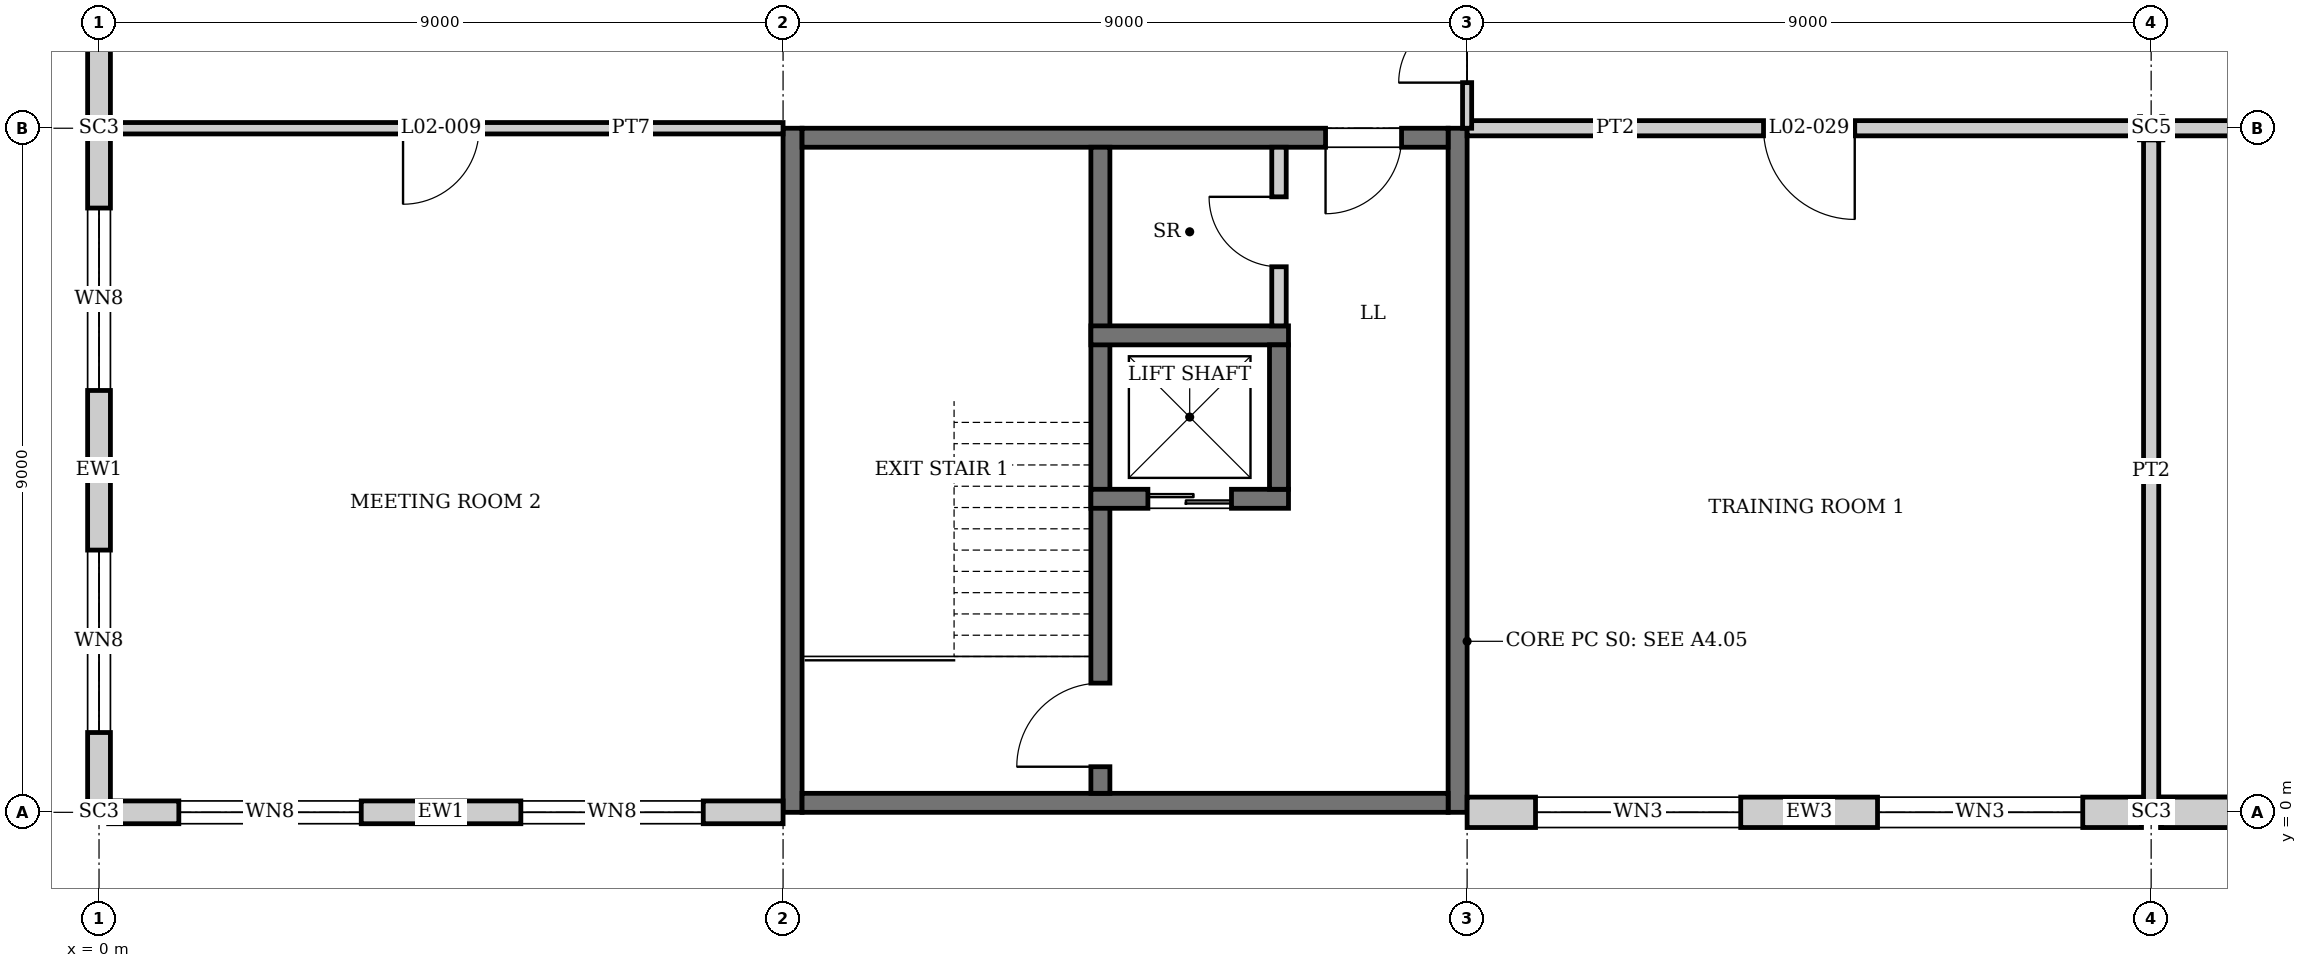
"""IFC4 building model, lengths in metres.
Left out: names, types, materials, properties, quantities, classifications, styles, units other than length and angle.
Written with IfcOpenShell. Run it as: python <this file> out.ifc"""

import sys

from ifc_helpers import new_model, si_unit, direction, frame, frame_2d, origin, origin_2d, place, context, subcontext, project, spatial, polyline, rectangle, i_section, outline, extrude, element, fill, save


model = new_model("IFC4")
c1 = context("Model", 3, precision=1e-05, world=origin(), true_north=direction((0.0, 1.0)))
c2 = subcontext(c1, "Body", "Model", "MODEL_VIEW")
j1 = project(units=[si_unit("LENGTHUNIT", "METRE"), si_unit("PLANEANGLEUNIT", "RADIAN")], contexts=[c1])
p1 = place(None, origin())
s1 = spatial("IfcSite", under=j1, at=p1, CompositionType="ELEMENT")
p2 = place(p1, origin())
s2 = spatial("IfcBuilding", under=s1, at=p2, CompositionType="ELEMENT")
p3 = place(p2, frame((0.0, 0.0, 10.5)))
s3 = spatial("IfcBuildingStorey", under=s2, at=p3, CompositionType="ELEMENT", Elevation=10.5)
for number, where, z_axis, x_axis in (
    (1, (0.0, 0.0, 0.0), (0.0, 0.0, 1.0), (0.0, 1.0, 0.0)),
    (2, (0.0, 9.0, 0.0), (0.0, 0.0, 1.0), (0.0, 1.0, 0.0)),
    (3, (27.0, 0.0, 0.0), (0.0, 0.0, 1.0), (0.0, 1.0, 0.0)),
):
    element("IfcColumn", number, at=place(p3, frame(where, z_axis=z_axis, x_axis=x_axis)), inside=s3, PredefinedType="COLUMN", context=c2, shape_type="SweptSolid", body=[
        extrude(i_section(OverallWidth=0.254, OverallDepth=0.254, WebThickness=0.009, FlangeThickness=0.014, at=origin_2d()), origin(), (0.0, 0.0, 1.0), 4.5),
    ])
p4 = place(p3, frame((27.0, 9.0, 0.0), z_axis=(0.0, 0.0, 1.0), x_axis=(0.0, 1.0, 0.0)))
e4 = element("IfcColumn", 4, at=p4, inside=s3, PredefinedType="COLUMN", context=c2, shape_type="SweptSolid", body=[
    extrude(i_section(OverallWidth=0.305, OverallDepth=0.308, WebThickness=0.01, FlangeThickness=0.015, at=origin_2d()), origin(), (0.0, 0.0, 1.0), 4.5),
])
for number, where, z_axis, x_axis in (
    (5, (9.125, 0.0, 0.0), (0.0, 0.0, 1.0), (0.0, 1.0, 0.0)),
    (6, (17.875, 0.0, 0.0), (0.0, 0.0, 1.0), (0.0, 1.0, 0.0)),
):
    element("IfcWall", number, at=place(p3, frame(where, z_axis=z_axis, x_axis=x_axis)), inside=s3, PredefinedType="SHEAR", context=c2, shape_type="SweptSolid", body=[
        extrude(rectangle(XDim=9.0, YDim=0.25, at=frame_2d((4.5, 0.0))), origin(), (0.0, 0.0, 1.0), 4.35),
    ])
p5 = place(p3, frame((9.25, 0.125, 0.0), z_axis=(0.0, 0.0, 1.0), x_axis=(1.0, 0.0, 0.0)))
e7 = element("IfcWall", 7, at=p5, inside=s3, PredefinedType="SHEAR", context=c2, shape_type="SweptSolid", body=[
    extrude(rectangle(XDim=8.5, YDim=0.25, at=frame_2d((4.25, 0.0))), origin(), (0.0, 0.0, 1.0), 4.35),
])
p6 = place(p3, frame((9.25, 8.875, 0.0), z_axis=(0.0, 0.0, 1.0), x_axis=(1.0, 0.0, 0.0)))
e8 = element("IfcWall", 8, at=p6, inside=s3, PredefinedType="SHEAR", context=c2, shape_type="SweptSolid", body=[
    extrude(rectangle(XDim=8.5, YDim=0.25, at=frame_2d((4.25, 0.0))), origin(), (0.0, 0.0, 1.0), 4.35),
])
p7 = place(p6, frame((6.887, 0.0, 0.0)))
e9 = element("IfcOpeningElement", 9, at=p7, cuts=e8, PredefinedType="OPENING", context=c2, shape_type="SweptSolid", body=[
    extrude(rectangle(XDim=1.0, YDim=2.1, at=frame_2d((0.5, 1.05))), frame((0.0, 0.135, 0.0), z_axis=(0.0, -1.0, 0.0), x_axis=(1.0, 0.0, 0.0)), (0.0, 0.0, 1.0), 0.27),
])
p8 = place(p3, frame((0.127, 0.0, 0.0), z_axis=(0.0, 0.0, 1.0), x_axis=(1.0, 0.0, 0.0)))
e10 = element("IfcWall", 10, at=p8, inside=s3, PredefinedType="SOLIDWALL", context=c2, shape_type="SweptSolid", body=[
    extrude(rectangle(XDim=8.873, YDim=0.3, at=frame_2d((4.437, 0.0))), origin(), (0.0, 0.0, 1.0), 3.991),
])
p9 = place(p8, frame((0.923, 0.0, 0.9)))
e11 = element("IfcOpeningElement", 11, at=p9, cuts=e10, PredefinedType="OPENING", context=c2, shape_type="SweptSolid", body=[
    extrude(rectangle(XDim=2.4, YDim=2.1, at=frame_2d((1.2, 1.05))), frame((0.0, 0.16, 0.0), z_axis=(0.0, -1.0, 0.0), x_axis=(1.0, 0.0, 0.0)), (0.0, 0.0, 1.0), 0.32),
])
p10 = place(p8, frame((5.423, 0.0, 0.9)))
e12 = element("IfcOpeningElement", 12, at=p10, cuts=e10, PredefinedType="OPENING", context=c2, shape_type="SweptSolid", body=[
    extrude(rectangle(XDim=2.4, YDim=2.1, at=frame_2d((1.2, 1.05))), frame((0.0, 0.16, 0.0), z_axis=(0.0, -1.0, 0.0), x_axis=(1.0, 0.0, 0.0)), (0.0, 0.0, 1.0), 0.32),
])
p11 = place(p3, frame((18.0, 0.0, 0.0), z_axis=(0.0, 0.0, 1.0), x_axis=(1.0, 0.0, 0.0)))
e13 = element("IfcWall", 13, at=p11, inside=s3, PredefinedType="SOLIDWALL", context=c2, shape_type="SweptSolid", body=[
    extrude(rectangle(XDim=8.873, YDim=0.4, at=frame_2d((4.437, 0.0))), origin(), (0.0, 0.0, 1.0), 3.991),
])
p12 = place(p11, frame((0.9, 0.0, 1.5)))
e14 = element("IfcOpeningElement", 14, at=p12, cuts=e13, PredefinedType="OPENING", context=c2, shape_type="SweptSolid", body=[
    extrude(rectangle(XDim=2.7, YDim=1.5, at=frame_2d((1.35, 0.75))), frame((0.0, 0.21, 0.0), z_axis=(0.0, -1.0, 0.0), x_axis=(1.0, 0.0, 0.0)), (0.0, 0.0, 1.0), 0.42),
])
p13 = place(p11, frame((5.4, 0.0, 1.5)))
e15 = element("IfcOpeningElement", 15, at=p13, cuts=e13, PredefinedType="OPENING", context=c2, shape_type="SweptSolid", body=[
    extrude(rectangle(XDim=2.7, YDim=1.5, at=frame_2d((1.35, 0.75))), frame((0.0, 0.21, 0.0), z_axis=(0.0, -1.0, 0.0), x_axis=(1.0, 0.0, 0.0)), (0.0, 0.0, 1.0), 0.42),
])
p14 = place(p3, frame((27.127, 0.0, 0.0), z_axis=(0.0, 0.0, 1.0), x_axis=(1.0, 0.0, 0.0)))
e16 = element("IfcWall", 16, at=p14, inside=s3, PredefinedType="SOLIDWALL", context=c2, shape_type="SweptSolid", body=[
    extrude(outline(polyline([(8.746, 0.0), (0.0, 0.0), (0.0, 0.5), (0.048, 0.38), (8.746, 3.86), (8.746, 0.0)])), frame((0.0, 0.2, 0.0), z_axis=(0.0, -1.0, 0.0), x_axis=(1.0, 0.0, 0.0)), (0.0, 0.0, 1.0), 0.4),
])
p15 = place(p3, frame((27.127, 0.0, 0.0), z_axis=(0.0, 0.0, 1.0), x_axis=(1.0, 0.0, 0.0)))
e17 = element("IfcWall", 17, at=p15, inside=s3, PredefinedType="SOLIDWALL", context=c2, shape_type="SweptSolid", body=[
    extrude(outline(polyline([(0.0, 3.991), (8.375, 3.991), (0.0, 0.64), (0.0, 3.991)])), frame((0.0, 0.2, 0.0), z_axis=(0.0, -1.0, 0.0), x_axis=(1.0, 0.0, 0.0)), (0.0, 0.0, 1.0), 0.4),
])
p16 = place(p3, frame((0.0, 0.127, 0.0), z_axis=(0.0, 0.0, 1.0), x_axis=(0.0, 1.0, 0.0)))
e18 = element("IfcWall", 18, at=p16, inside=s3, PredefinedType="SOLIDWALL", context=c2, shape_type="SweptSolid", body=[
    extrude(rectangle(XDim=8.746, YDim=0.3, at=frame_2d((4.373, 0.0))), origin(), (0.0, 0.0, 1.0), 3.991),
])
p17 = place(p16, frame((0.923, 0.0, 0.9)))
e19 = element("IfcOpeningElement", 19, at=p17, cuts=e18, PredefinedType="OPENING", context=c2, shape_type="SweptSolid", body=[
    extrude(rectangle(XDim=2.4, YDim=2.1, at=frame_2d((1.2, 1.05))), frame((0.0, 0.16, 0.0), z_axis=(0.0, -1.0, 0.0), x_axis=(1.0, 0.0, 0.0)), (0.0, 0.0, 1.0), 0.32),
])
p18 = place(p16, frame((5.423, 0.0, 0.9)))
e20 = element("IfcOpeningElement", 20, at=p18, cuts=e18, PredefinedType="OPENING", context=c2, shape_type="SweptSolid", body=[
    extrude(rectangle(XDim=2.4, YDim=2.1, at=frame_2d((1.2, 1.05))), frame((0.0, 0.16, 0.0), z_axis=(0.0, -1.0, 0.0), x_axis=(1.0, 0.0, 0.0)), (0.0, 0.0, 1.0), 0.32),
])
p19 = place(p3, frame((0.0, 9.127, 0.0), z_axis=(0.0, 0.0, 1.0), x_axis=(0.0, 1.0, 0.0)))
e21 = element("IfcWall", 21, at=p19, inside=s3, PredefinedType="SOLIDWALL", context=c2, shape_type="SweptSolid", body=[
    extrude(rectangle(XDim=8.873, YDim=0.3, at=frame_2d((4.437, 0.0))), origin(), (0.0, 0.0, 1.0), 3.991),
])
p20 = place(p19, frame((1.223, 0.0, 0.9)))
e22 = element("IfcOpeningElement", 22, at=p20, cuts=e21, PredefinedType="OPENING", context=c2, shape_type="SweptSolid", body=[
    extrude(rectangle(XDim=1.8, YDim=2.4, at=frame_2d((0.9, 1.2))), frame((0.0, 0.16, 0.0), z_axis=(0.0, -1.0, 0.0), x_axis=(1.0, 0.0, 0.0)), (0.0, 0.0, 1.0), 0.32),
])
p21 = place(p19, frame((5.723, 0.0, 0.9)))
e23 = element("IfcOpeningElement", 23, at=p21, cuts=e21, PredefinedType="OPENING", context=c2, shape_type="SweptSolid", body=[
    extrude(rectangle(XDim=1.8, YDim=2.4, at=frame_2d((0.9, 1.2))), frame((0.0, 0.16, 0.0), z_axis=(0.0, -1.0, 0.0), x_axis=(1.0, 0.0, 0.0)), (0.0, 0.0, 1.0), 0.32),
])
p22 = place(p3, frame((13.175, 0.25, 0.0), z_axis=(0.0, 0.0, 1.0), x_axis=(0.0, 1.0, 0.0)))
e24 = element("IfcWall", 24, at=p22, inside=s3, PredefinedType="SOLIDWALL", context=c2, shape_type="SweptSolid", body=[
    extrude(rectangle(XDim=8.5, YDim=0.25, at=frame_2d((4.25, 0.0))), origin(), (0.0, 0.0, 1.0), 4.35),
])
p23 = place(p22, frame((0.35, 0.0, 0.0)))
e25 = element("IfcOpeningElement", 25, at=p23, cuts=e24, PredefinedType="OPENING", context=c2, shape_type="SweptSolid", body=[
    extrude(rectangle(XDim=1.1, YDim=2.1, at=frame_2d((0.55, 1.05))), frame((0.0, 0.135, 0.0), z_axis=(0.0, -1.0, 0.0), x_axis=(1.0, 0.0, 0.0)), (0.0, 0.0, 1.0), 0.27),
])
p24 = place(p3, frame((13.05, 4.125, 0.0), z_axis=(0.0, 0.0, 1.0), x_axis=(1.0, 0.0, 0.0)))
e26 = element("IfcWall", 26, at=p24, inside=s3, PredefinedType="SOLIDWALL", context=c2, shape_type="SweptSolid", body=[
    extrude(rectangle(XDim=2.6, YDim=0.25, at=frame_2d((1.3, 0.0))), origin(), (0.0, 0.0, 1.0), 4.35),
])
p25 = place(p24, frame((0.75, 0.0, 0.0)))
e27 = element("IfcOpeningElement", 27, at=p25, cuts=e26, PredefinedType="OPENING", context=c2, shape_type="SweptSolid", body=[
    extrude(rectangle(XDim=1.1, YDim=2.1, at=frame_2d((0.55, 1.05))), frame((0.0, 0.135, 0.0), z_axis=(0.0, -1.0, 0.0), x_axis=(1.0, 0.0, 0.0)), (0.0, 0.0, 1.0), 0.27),
])
p26 = place(p3, frame((13.05, 6.275, 0.0), z_axis=(0.0, 0.0, 1.0), x_axis=(1.0, 0.0, 0.0)))
e28 = element("IfcWall", 28, at=p26, inside=s3, PredefinedType="SOLIDWALL", context=c2, shape_type="SweptSolid", body=[
    extrude(rectangle(XDim=2.6, YDim=0.25, at=frame_2d((1.3, 0.0))), origin(), (0.0, 0.0, 1.0), 4.35),
])
p27 = place(p3, frame((15.525, 4.25, 0.0), z_axis=(0.0, 0.0, 1.0), x_axis=(0.0, 1.0, 0.0)))
e29 = element("IfcWall", 29, at=p27, inside=s3, PredefinedType="SOLIDWALL", context=c2, shape_type="SweptSolid", body=[
    extrude(rectangle(XDim=1.9, YDim=0.25, at=frame_2d((0.95, 0.0))), origin(), (0.0, 0.0, 1.0), 4.35),
])
p28 = place(p3, frame((0.127, 9.0, 0.0), z_axis=(0.0, 0.0, 1.0), x_axis=(1.0, 0.0, 0.0)))
e30 = element("IfcWall", 30, at=p28, inside=s3, PredefinedType="PARTITIONING", context=c2, shape_type="SweptSolid", body=[
    extrude(rectangle(XDim=8.873, YDim=0.15, at=frame_2d((4.437, 0.0))), origin(), (0.0, 0.0, 1.0), 3.822),
])
p29 = place(p28, frame((3.873, 0.0, 0.0)))
e31 = element("IfcOpeningElement", 31, at=p29, cuts=e30, PredefinedType="OPENING", context=c2, shape_type="SweptSolid", body=[
    extrude(rectangle(XDim=1.0, YDim=2.1, at=frame_2d((0.5, 1.05))), frame((0.0, 0.085, 0.0), z_axis=(0.0, -1.0, 0.0), x_axis=(1.0, 0.0, 0.0)), (0.0, 0.0, 1.0), 0.17),
])
p30 = place(p3, frame((18.0, 9.0, 0.0), z_axis=(0.0, 0.0, 1.0), x_axis=(1.0, 0.0, 0.0)))
e32 = element("IfcWall", 32, at=p30, inside=s3, PredefinedType="PARTITIONING", context=c2, shape_type="SweptSolid", body=[
    extrude(rectangle(XDim=8.846, YDim=0.2, at=frame_2d((4.423, 0.0))), origin(), (0.0, 0.0, 1.0), 2.414),
])
p31 = place(p30, frame((3.9, 0.0, 0.0)))
e33 = element("IfcOpeningElement", 33, at=p31, cuts=e32, PredefinedType="OPENING", context=c2, shape_type="SweptSolid", body=[
    extrude(rectangle(XDim=1.2, YDim=2.1, at=frame_2d((0.6, 1.05))), frame((0.0, 0.11, 0.0), z_axis=(0.0, -1.0, 0.0), x_axis=(1.0, 0.0, 0.0)), (0.0, 0.0, 1.0), 0.22),
])
p32 = place(p3, frame((27.154, 9.0, 0.0), z_axis=(0.0, 0.0, 1.0), x_axis=(1.0, 0.0, 0.0)))
e34 = element("IfcWall", 34, at=p32, inside=s3, PredefinedType="PARTITIONING", context=c2, shape_type="SweptSolid", body=[
    extrude(rectangle(XDim=8.692, YDim=0.2, at=frame_2d((4.346, 0.0))), origin(), (0.0, 0.0, 1.0), 2.414),
])
p33 = place(p3, frame((15.525, 6.4, 0.0), z_axis=(0.0, 0.0, 1.0), x_axis=(0.0, 1.0, 0.0)))
e35 = element("IfcWall", 35, at=p33, inside=s3, PredefinedType="PARTITIONING", context=c2, shape_type="SweptSolid", body=[
    extrude(rectangle(XDim=2.35, YDim=0.19, at=frame_2d((1.175, 0.0))), origin(), (0.0, 0.0, 1.0), 4.35),
])
p34 = place(p33, frame((0.778, 0.0, 0.0)))
e36 = element("IfcOpeningElement", 36, at=p34, cuts=e35, PredefinedType="OPENING", context=c2, shape_type="SweptSolid", body=[
    extrude(rectangle(XDim=0.92, YDim=2.1, at=frame_2d((0.46, 1.05))), frame((0.0, 0.105, 0.0), z_axis=(0.0, -1.0, 0.0), x_axis=(1.0, 0.0, 0.0)), (0.0, 0.0, 1.0), 0.21),
])
p35 = place(p3, frame((18.0, 9.0, 0.0), z_axis=(0.0, 0.0, 1.0), x_axis=(0.0, 1.0, 0.0)))
e37 = element("IfcWall", 37, at=p35, inside=s3, PredefinedType="PARTITIONING", context=c2, shape_type="SweptSolid", body=[
    extrude(rectangle(XDim=3.0, YDim=0.12, at=frame_2d((1.5, 0.0))), origin(), (0.0, 0.0, 1.0), 2.414),
])
p36 = place(p35, frame((0.6, 0.0, 0.0)))
e38 = element("IfcOpeningElement", 38, at=p36, cuts=e37, PredefinedType="OPENING", context=c2, shape_type="SweptSolid", body=[
    extrude(rectangle(XDim=1.8, YDim=2.1, at=frame_2d((0.9, 1.05))), frame((0.0, 0.07, 0.0), z_axis=(0.0, -1.0, 0.0), x_axis=(1.0, 0.0, 0.0)), (0.0, 0.0, 1.0), 0.14),
])
p37 = place(p3, frame((27.0, 0.127, 0.0), z_axis=(0.0, 0.0, 1.0), x_axis=(0.0, 1.0, 0.0)))
e39 = element("IfcWall", 39, at=p37, inside=s3, PredefinedType="PARTITIONING", context=c2, shape_type="SweptSolid", body=[
    extrude(rectangle(XDim=8.719, YDim=0.2, at=frame_2d((4.359, 0.0))), origin(), (0.0, 0.0, 1.0), 3.998),
])
p38 = place(p9, origin())
e40 = element("IfcWindow", 40, at=p38, inside=s3, PartitioningType="SINGLE_PANEL", PredefinedType="WINDOW", context=c2, shape_type="SweptSolid", body=[
    extrude(rectangle(XDim=2.4, YDim=2.1, at=frame_2d((1.2, 1.05))), frame((0.0, 0.03, 0.0), z_axis=(0.0, -1.0, 0.0), x_axis=(1.0, 0.0, 0.0)), (0.0, 0.0, 1.0), 0.06),
])
fill(e11, e40)
p39 = place(p10, origin())
e41 = element("IfcWindow", 41, at=p39, inside=s3, PartitioningType="SINGLE_PANEL", PredefinedType="WINDOW", context=c2, shape_type="SweptSolid", body=[
    extrude(rectangle(XDim=2.4, YDim=2.1, at=frame_2d((1.2, 1.05))), frame((0.0, 0.03, 0.0), z_axis=(0.0, -1.0, 0.0), x_axis=(1.0, 0.0, 0.0)), (0.0, 0.0, 1.0), 0.06),
])
fill(e12, e41)
p40 = place(p12, origin())
e42 = element("IfcWindow", 42, at=p40, inside=s3, PartitioningType="SINGLE_PANEL", PredefinedType="WINDOW", context=c2, shape_type="SweptSolid", body=[
    extrude(rectangle(XDim=2.7, YDim=1.5, at=frame_2d((1.35, 0.75))), frame((0.0, 0.03, 0.0), z_axis=(0.0, -1.0, 0.0), x_axis=(1.0, 0.0, 0.0)), (0.0, 0.0, 1.0), 0.06),
])
fill(e14, e42)
p41 = place(p13, origin())
e43 = element("IfcWindow", 43, at=p41, inside=s3, PartitioningType="SINGLE_PANEL", PredefinedType="WINDOW", context=c2, shape_type="SweptSolid", body=[
    extrude(rectangle(XDim=2.7, YDim=1.5, at=frame_2d((1.35, 0.75))), frame((0.0, 0.03, 0.0), z_axis=(0.0, -1.0, 0.0), x_axis=(1.0, 0.0, 0.0)), (0.0, 0.0, 1.0), 0.06),
])
fill(e15, e43)
p42 = place(p17, origin())
e44 = element("IfcWindow", 44, at=p42, inside=s3, PartitioningType="SINGLE_PANEL", PredefinedType="WINDOW", context=c2, shape_type="SweptSolid", body=[
    extrude(rectangle(XDim=2.4, YDim=2.1, at=frame_2d((1.2, 1.05))), frame((0.0, 0.03, 0.0), z_axis=(0.0, -1.0, 0.0), x_axis=(1.0, 0.0, 0.0)), (0.0, 0.0, 1.0), 0.06),
])
fill(e19, e44)
p43 = place(p18, origin())
e45 = element("IfcWindow", 45, at=p43, inside=s3, PartitioningType="SINGLE_PANEL", PredefinedType="WINDOW", context=c2, shape_type="SweptSolid", body=[
    extrude(rectangle(XDim=2.4, YDim=2.1, at=frame_2d((1.2, 1.05))), frame((0.0, 0.03, 0.0), z_axis=(0.0, -1.0, 0.0), x_axis=(1.0, 0.0, 0.0)), (0.0, 0.0, 1.0), 0.06),
])
fill(e20, e45)
p44 = place(p25, origin())
e46 = element("IfcDoor", 46, at=p44, inside=s3, OperationType="DOUBLE_DOOR_SLIDING", PredefinedType="DOOR", context=c2, shape_type="SweptSolid", body=[
    extrude(rectangle(XDim=1.1, YDim=2.1, at=frame_2d((0.55, 1.05))), frame((0.0, 0.025, 0.0), z_axis=(0.0, -1.0, 0.0), x_axis=(1.0, 0.0, 0.0)), (0.0, 0.0, 1.0), 0.05),
])
fill(e27, e46)
p45 = place(p36, origin())
e47 = element("IfcDoor", 47, at=p45, inside=s3, OperationType="DOUBLE_DOOR_SINGLE_SWING", PredefinedType="DOOR", context=c2, shape_type="SweptSolid", body=[
    extrude(rectangle(XDim=1.8, YDim=2.1, at=frame_2d((0.9, 1.05))), frame((0.0, 0.025, 0.0), z_axis=(0.0, -1.0, 0.0), x_axis=(1.0, 0.0, 0.0)), (0.0, 0.0, 1.0), 0.05),
])
fill(e38, e47)
p46 = place(p29, frame((1.0, 0.0, 0.0), z_axis=(0.0, 0.0, 1.0), x_axis=(-1.0, 0.0, 0.0)))
e48 = element("IfcDoor", 48, at=p46, inside=s3, OperationType="SINGLE_SWING_RIGHT", PredefinedType="DOOR", context=c2, shape_type="SweptSolid", body=[
    extrude(rectangle(XDim=1.0, YDim=2.1, at=frame_2d((0.5, 1.05))), frame((0.0, 0.025, 0.0), z_axis=(0.0, -1.0, 0.0), x_axis=(1.0, 0.0, 0.0)), (0.0, 0.0, 1.0), 0.05),
])
fill(e31, e48)
p47 = place(p23, origin())
e49 = element("IfcDoor", 49, at=p47, inside=s3, OperationType="SINGLE_SWING_LEFT", PredefinedType="DOOR", context=c2, shape_type="SweptSolid", body=[
    extrude(rectangle(XDim=1.1, YDim=2.1, at=frame_2d((0.55, 1.05))), frame((0.0, 0.025, 0.0), z_axis=(0.0, -1.0, 0.0), x_axis=(1.0, 0.0, 0.0)), (0.0, 0.0, 1.0), 0.05),
])
fill(e25, e49)
p48 = place(p7, frame((1.0, 0.0, 0.0), z_axis=(0.0, 0.0, 1.0), x_axis=(-1.0, 0.0, 0.0)))
e50 = element("IfcDoor", 50, at=p48, inside=s3, OperationType="SINGLE_SWING_RIGHT", PredefinedType="DOOR", context=c2, shape_type="SweptSolid", body=[
    extrude(rectangle(XDim=1.0, YDim=2.1, at=frame_2d((0.5, 1.05))), frame((0.0, 0.025, 0.0), z_axis=(0.0, -1.0, 0.0), x_axis=(1.0, 0.0, 0.0)), (0.0, 0.0, 1.0), 0.05),
])
fill(e9, e50)
p49 = place(p34, origin())
e51 = element("IfcDoor", 51, at=p49, inside=s3, OperationType="SINGLE_SWING_RIGHT", PredefinedType="DOOR", context=c2, shape_type="SweptSolid", body=[
    extrude(rectangle(XDim=0.92, YDim=2.1, at=frame_2d((0.46, 1.05))), frame((0.0, 0.025, 0.0), z_axis=(0.0, -1.0, 0.0), x_axis=(1.0, 0.0, 0.0)), (0.0, 0.0, 1.0), 0.05),
])
fill(e36, e51)
p50 = place(p31, frame((1.2, 0.0, 0.0), z_axis=(0.0, 0.0, 1.0), x_axis=(-1.0, 0.0, 0.0)))
e52 = element("IfcDoor", 52, at=p50, inside=s3, OperationType="SINGLE_SWING_LEFT", PredefinedType="DOOR", context=c2, shape_type="SweptSolid", body=[
    extrude(rectangle(XDim=1.2, YDim=2.1, at=frame_2d((0.6, 1.05))), frame((0.0, 0.025, 0.0), z_axis=(0.0, -1.0, 0.0), x_axis=(1.0, 0.0, 0.0)), (0.0, 0.0, 1.0), 0.05),
])
fill(e33, e52)
save(model, sys.argv[1])
